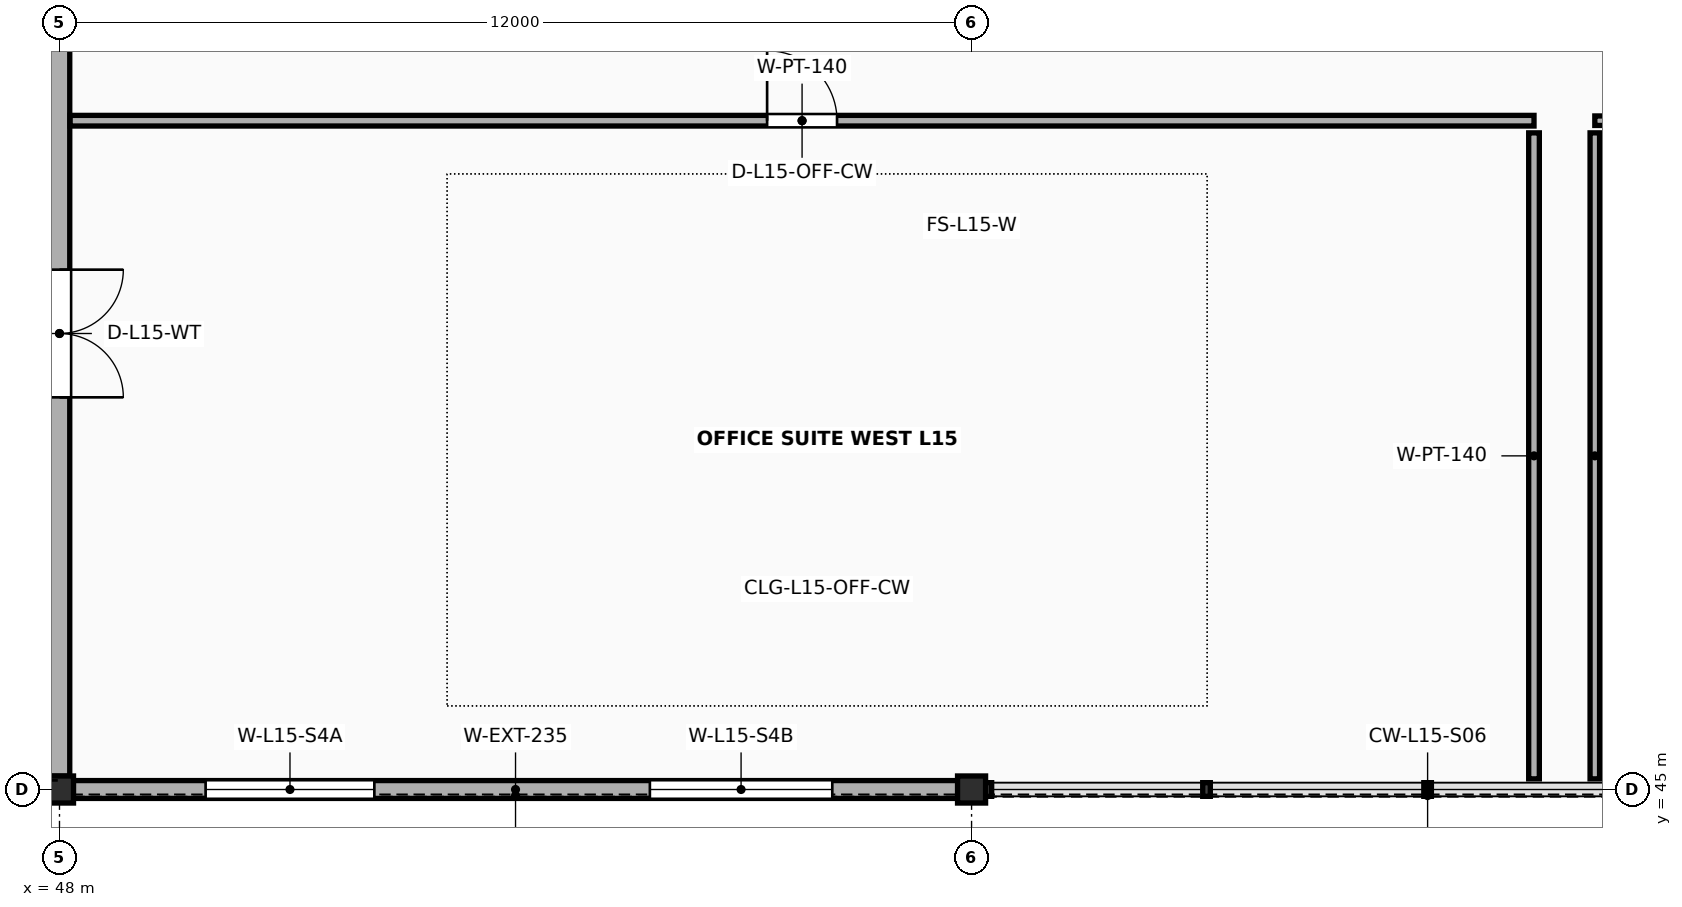
"""IFC4 building model, lengths in metres.
Left out: names, types, materials, properties, quantities, classifications, styles, units other than length and angle.
Written with IfcOpenShell. Run it as: python <this file> out.ifc"""

import sys

from ifc_helpers import new_model, si_unit, direction, frame, frame_2d, origin, origin_2d, place, context, subcontext, project, spatial, rectangle, i_section, extrude, element, fill, save


model = new_model("IFC4")
c1 = context("Model", 3, precision=1e-05, world=origin(), true_north=direction((0.0, 1.0)))
c2 = subcontext(c1, "Body", "Model", "MODEL_VIEW")
j1 = project(units=[si_unit("LENGTHUNIT", "METRE"), si_unit("PLANEANGLEUNIT", "RADIAN")], contexts=[c1])
p1 = place(None, origin())
s1 = spatial("IfcSite", under=j1, at=p1, CompositionType="ELEMENT")
p2 = place(p1, origin())
s2 = spatial("IfcBuilding", under=s1, at=p2, CompositionType="ELEMENT")
p3 = place(p2, frame((0.0, 0.0, 61.6)))
s3 = spatial("IfcBuildingStorey", under=s2, at=p3, CompositionType="ELEMENT", Elevation=61.6)
for number, where, z_axis, x_axis in (
    (1, (48.0, 45.0, 0.0), (0.0, 0.0, 1.0), (1.0, 0.0, 0.0)),
    (2, (60.0, 45.0, 0.0), (0.0, 0.0, 1.0), (1.0, 0.0, 0.0)),
):
    element("IfcColumn", number, at=place(p3, frame(where, z_axis=z_axis, x_axis=x_axis)), inside=s3, PredefinedType="COLUMN", context=c2, shape_type="SweptSolid", body=[
        extrude(i_section(OverallWidth=0.369, OverallDepth=0.356, WebThickness=0.011, FlangeThickness=0.018, FilletRadius=0.018, at=origin_2d()), origin(), (0.0, 0.0, 1.0), 4.0),
    ])
p4 = place(p3, frame((48.183, 45.0, 0.0), z_axis=(0.0, 0.0, 1.0), x_axis=(1.0, 0.0, 0.0)))
e3 = element("IfcWall", 3, at=p4, inside=s3, PredefinedType="SOLIDWALL", context=c2, shape_type="SweptSolid", body=[
    extrude(rectangle(XDim=11.635, YDim=0.235, at=frame_2d((5.817, 0.0))), origin(), (0.0, 0.0, 1.0), 3.296),
])
p5 = place(p4, frame((1.74, 0.0, 0.78)))
e4 = element("IfcOpeningElement", 4, at=p5, cuts=e3, PredefinedType="OPENING", context=c2, shape_type="SweptSolid", body=[
    extrude(rectangle(XDim=2.22, YDim=1.74, at=frame_2d((1.11, 0.87))), frame((0.0, 0.133, 0.0), z_axis=(0.0, -1.0, 0.0), x_axis=(1.0, 0.0, 0.0)), (0.0, 0.0, 1.0), 0.265),
])
p6 = place(p4, frame((7.585, 0.0, 0.78)))
e5 = element("IfcOpeningElement", 5, at=p6, cuts=e3, PredefinedType="OPENING", context=c2, shape_type="SweptSolid", body=[
    extrude(rectangle(XDim=2.4, YDim=1.74, at=frame_2d((1.2, 0.87))), frame((0.0, 0.133, 0.0), z_axis=(0.0, -1.0, 0.0), x_axis=(1.0, 0.0, 0.0)), (0.0, 0.0, 1.0), 0.265),
])
p7 = place(p3, frame((48.0, 45.176, 0.0), z_axis=(0.0, 0.0, 1.0), x_axis=(0.0, 1.0, 0.0)))
e6 = element("IfcWall", 6, at=p7, inside=s3, PredefinedType="SOLIDWALL", context=c2, shape_type="SweptSolid", body=[
    extrude(rectangle(XDim=11.648, YDim=0.27, at=frame_2d((5.824, 0.0))), origin(), (0.0, 0.0, 1.0), 3.296),
])
p8 = place(p7, frame((4.984, 0.0, 0.0)))
e7 = element("IfcOpeningElement", 7, at=p8, cuts=e6, PredefinedType="OPENING", context=c2, shape_type="SweptSolid", body=[
    extrude(rectangle(XDim=1.68, YDim=2.34, at=frame_2d((0.84, 1.17))), frame((0.0, 0.15, 0.0), z_axis=(0.0, -1.0, 0.0), x_axis=(1.0, 0.0, 0.0)), (0.0, 0.0, 1.0), 0.3),
])
p9 = place(p3, frame((48.14, 53.8, 0.0), z_axis=(0.0, 0.0, 1.0), x_axis=(1.0, 0.0, 0.0)))
e8 = element("IfcWall", 8, at=p9, inside=s3, PredefinedType="PARTITIONING", context=c2, shape_type="SweptSolid", body=[
    extrude(rectangle(XDim=19.26, YDim=0.14, at=frame_2d((9.63, 0.0))), origin(), (0.0, 0.0, 1.0), 2.88),
])
p10 = place(p9, frame((9.17, 0.0, 0.0)))
e9 = element("IfcOpeningElement", 9, at=p10, cuts=e8, PredefinedType="OPENING", context=c2, shape_type="SweptSolid", body=[
    extrude(rectangle(XDim=0.92, YDim=2.1, at=frame_2d((0.46, 1.05))), frame((0.0, 0.085, 0.0), z_axis=(0.0, -1.0, 0.0), x_axis=(1.0, 0.0, 0.0)), (0.0, 0.0, 1.0), 0.17),
])
p11 = place(p3, frame((67.4, 45.14, 0.0), z_axis=(0.0, 0.0, 1.0), x_axis=(0.0, 1.0, 0.0)))
e10 = element("IfcWall", 10, at=p11, inside=s3, PredefinedType="PARTITIONING", context=c2, shape_type="SweptSolid", body=[
    extrude(rectangle(XDim=8.5, YDim=0.14, at=frame_2d((4.25, 0.0))), origin(), (0.0, 0.0, 1.0), 2.88),
])
p12 = place(p3, frame((68.2, 53.8, 0.0), z_axis=(0.0, 0.0, 1.0), x_axis=(1.0, 0.0, 0.0)))
e11 = element("IfcWall", 11, at=p12, inside=s3, PredefinedType="PARTITIONING", context=c2, shape_type="SweptSolid", body=[
    extrude(rectangle(XDim=15.2, YDim=0.125, at=frame_2d((7.6, 0.0))), origin(), (0.0, 0.0, 1.0), 2.88),
])
p13 = place(p12, frame((6.855, 0.0, 0.0)))
e12 = element("IfcOpeningElement", 12, at=p13, cuts=e11, PredefinedType="OPENING", context=c2, shape_type="SweptSolid", body=[
    extrude(rectangle(XDim=1.49, YDim=2.28, at=frame_2d((0.745, 1.14))), frame((0.0, 0.077, 0.0), z_axis=(0.0, -1.0, 0.0), x_axis=(1.0, 0.0, 0.0)), (0.0, 0.0, 1.0), 0.155),
])
p14 = place(p3, frame((68.2, 45.14, 0.0), z_axis=(0.0, 0.0, 1.0), x_axis=(0.0, 1.0, 0.0)))
e13 = element("IfcWall", 13, at=p14, inside=s3, PredefinedType="PARTITIONING", context=c2, shape_type="SweptSolid", body=[
    extrude(rectangle(XDim=8.5, YDim=0.125, at=frame_2d((4.25, 0.0))), origin(), (0.0, 0.0, 1.0), 2.88),
])
p15 = place(p5, origin())
e14 = element("IfcWindow", 14, at=p15, inside=s3, PartitioningType="DOUBLE_PANEL_VERTICAL", PredefinedType="WINDOW", context=c2, shape_type="SweptSolid", body=[
    extrude(rectangle(XDim=2.22, YDim=1.74, at=frame_2d((1.11, 0.87))), frame((0.0, 0.03, 0.0), z_axis=(0.0, -1.0, 0.0), x_axis=(1.0, 0.0, 0.0)), (0.0, 0.0, 1.0), 0.06),
])
fill(e4, e14)
p16 = place(p6, origin())
e15 = element("IfcWindow", 15, at=p16, inside=s3, PartitioningType="DOUBLE_PANEL_VERTICAL", PredefinedType="WINDOW", context=c2, shape_type="SweptSolid", body=[
    extrude(rectangle(XDim=2.4, YDim=1.74, at=frame_2d((1.2, 0.87))), frame((0.0, 0.03, 0.0), z_axis=(0.0, -1.0, 0.0), x_axis=(1.0, 0.0, 0.0)), (0.0, 0.0, 1.0), 0.06),
])
fill(e5, e15)
p17 = place(p8, origin())
e16 = element("IfcDoor", 16, at=p17, inside=s3, OperationType="DOUBLE_DOOR_SINGLE_SWING", PredefinedType="DOOR", context=c2, shape_type="SweptSolid", body=[
    extrude(rectangle(XDim=1.68, YDim=2.34, at=frame_2d((0.84, 1.17))), frame((0.0, 0.025, 0.0), z_axis=(0.0, -1.0, 0.0), x_axis=(1.0, 0.0, 0.0)), (0.0, 0.0, 1.0), 0.05),
])
fill(e7, e16)
p18 = place(p10, origin())
e17 = element("IfcDoor", 17, at=p18, inside=s3, OperationType="SINGLE_SWING_LEFT", PredefinedType="DOOR", context=c2, shape_type="SweptSolid", body=[
    extrude(rectangle(XDim=0.92, YDim=2.1, at=frame_2d((0.46, 1.05))), frame((0.0, 0.025, 0.0), z_axis=(0.0, -1.0, 0.0), x_axis=(1.0, 0.0, 0.0)), (0.0, 0.0, 1.0), 0.05),
])
fill(e9, e17)
save(model, sys.argv[1])
